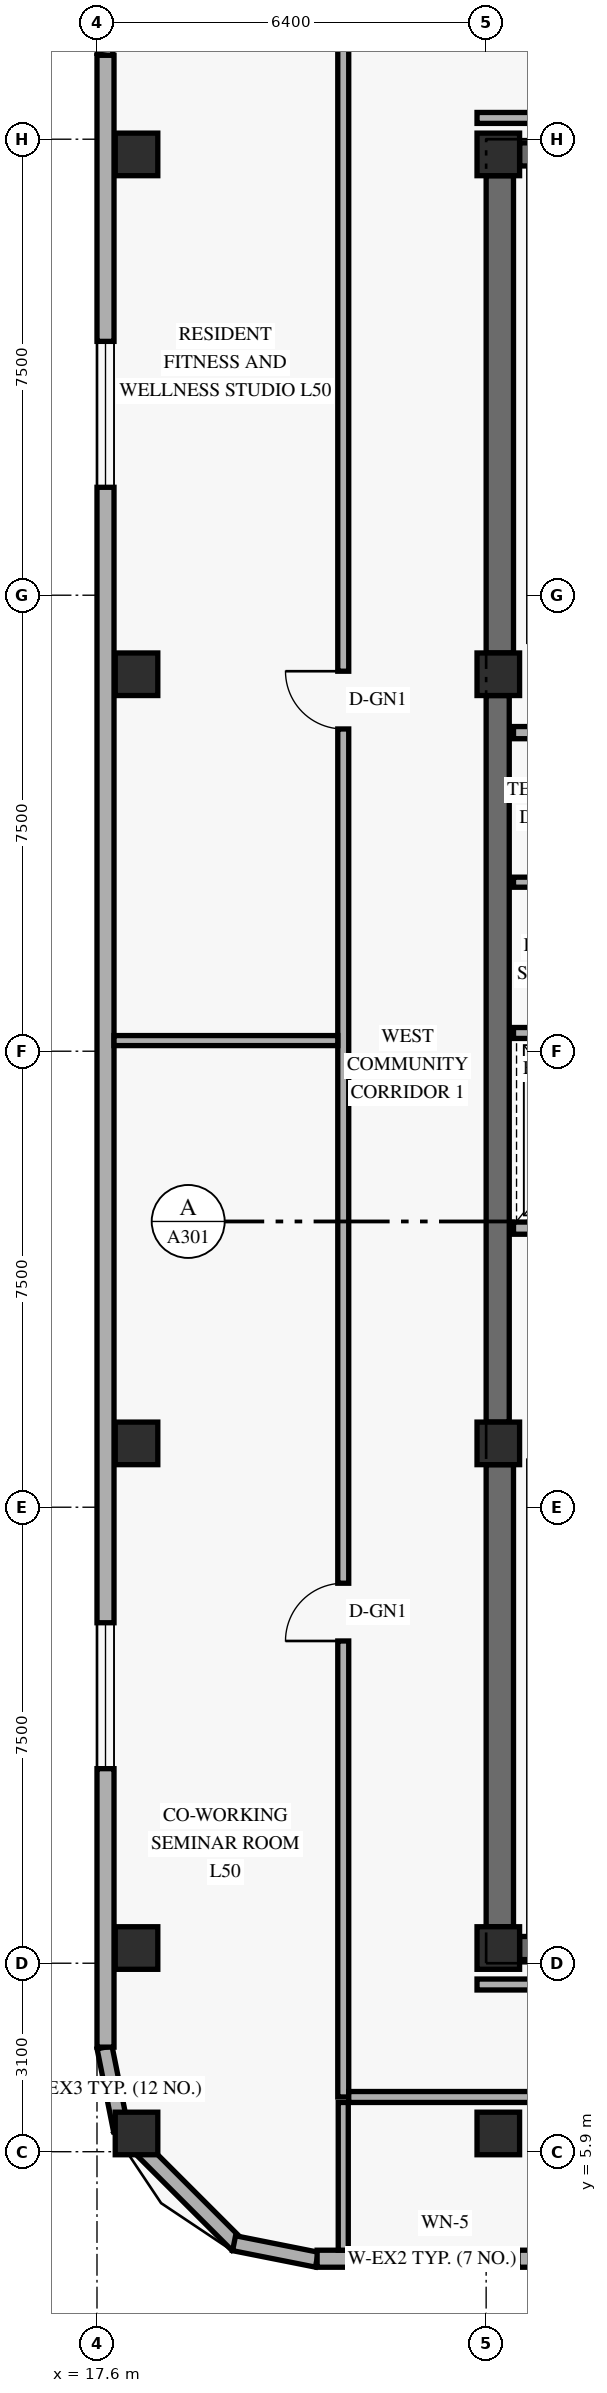
"""IFC4 building model, lengths in metres.
Left out: names, types, materials, properties, quantities, classifications, styles, units other than length and angle.
Written with IfcOpenShell. Run it as: python <this file> out.ifc"""

import sys

from ifc_helpers import new_model, si_unit, direction, frame, frame_2d, origin, origin_2d, place, context, subcontext, project, spatial, rectangle, extrude, element, fill, save


model = new_model("IFC4")
c1 = context("Model", 3, precision=1e-05, world=origin(), true_north=direction((0.0, 1.0)))
c2 = subcontext(c1, "Body", "Model", "MODEL_VIEW")
j1 = project(units=[si_unit("LENGTHUNIT", "METRE"), si_unit("PLANEANGLEUNIT", "RADIAN")], contexts=[c1])
p1 = place(None, origin())
s1 = spatial("IfcSite", under=j1, at=p1, CompositionType="ELEMENT")
p2 = place(p1, origin())
s2 = spatial("IfcBuilding", under=s1, at=p2, CompositionType="ELEMENT")
p3 = place(p2, frame((0.0, 0.0, 192.0)))
s3 = spatial("IfcBuildingStorey", under=s2, at=p3, CompositionType="ELEMENT", Elevation=192.0)
p4 = place(p3, frame((24.225, 9.6, 0.0), z_axis=(0.0, 0.0, 1.0), x_axis=(0.0, 1.0, 0.0)))
e1 = element("IfcWall", 1, at=p4, inside=s3, PredefinedType="SHEAR", context=c2, shape_type="SweptSolid", body=[
    extrude(rectangle(XDim=7.6, YDim=0.45, at=frame_2d((3.8, 0.0))), origin(), (0.0, 0.0, 1.0), 3.348),
])
p5 = place(p3, frame((24.19, 17.9, 0.0), z_axis=(0.0, 0.0, 1.0), x_axis=(0.0, 1.0, 0.0)))
e2 = element("IfcWall", 2, at=p5, inside=s3, PredefinedType="SHEAR", context=c2, shape_type="SweptSolid", body=[
    extrude(rectangle(XDim=11.95, YDim=0.38, at=frame_2d((5.975, 0.0))), origin(), (0.0, 0.0, 1.0), 3.348),
])
p6 = place(p3, frame((24.225, 30.55, 0.0), z_axis=(0.0, 0.0, 1.0), x_axis=(0.0, 1.0, 0.0)))
e3 = element("IfcWall", 3, at=p6, inside=s3, PredefinedType="SHEAR", context=c2, shape_type="SweptSolid", body=[
    extrude(rectangle(XDim=7.85, YDim=0.45, at=frame_2d((3.925, 0.0))), origin(), (0.0, 0.0, 1.0), 3.348),
])
for number, where, z_axis, x_axis in (
    (4, (24.55, 9.25, 0.0), (0.0, 0.0, 1.0), (1.0, 0.0, 0.0)),
    (5, (24.55, 38.75, 0.0), (0.0, 0.0, 1.0), (1.0, 0.0, 0.0)),
):
    element("IfcWall", number, at=place(p3, frame(where, z_axis=z_axis, x_axis=x_axis)), inside=s3, PredefinedType="SHEAR", context=c2, shape_type="SweptSolid", body=[
        extrude(rectangle(XDim=10.3, YDim=0.38, at=frame_2d((5.15, 0.0))), origin(), (0.0, 0.0, 1.0), 3.96),
    ])
for number, where, z_axis, x_axis in (
    (6, (18.25, 6.2, 0.0), (0.0, 0.0, 1.0), (1.0, 0.0, 0.0)),
    (7, (18.25, 9.25, 0.0), (0.0, 0.0, 1.0), (1.0, 0.0, 0.0)),
    (8, (18.25, 17.55, 0.0), (0.0, 0.0, 1.0), (1.0, 0.0, 0.0)),
    (9, (18.25, 30.2, 0.0), (0.0, 0.0, 1.0), (1.0, 0.0, 0.0)),
    (10, (18.25, 38.75, 0.0), (0.0, 0.0, 1.0), (1.0, 0.0, 0.0)),
    (11, (24.2, 6.2, 0.0), (0.0, 0.0, 1.0), (1.0, 0.0, 0.0)),
    (12, (24.2, 9.25, 0.0), (0.0, 0.0, 1.0), (1.0, 0.0, 0.0)),
    (13, (24.2, 17.55, 0.0), (0.0, 0.0, 1.0), (1.0, 0.0, 0.0)),
    (14, (24.2, 30.2, 0.0), (0.0, 0.0, 1.0), (1.0, 0.0, 0.0)),
    (15, (24.2, 38.75, 0.0), (0.0, 0.0, 1.0), (1.0, 0.0, 0.0)),
):
    element("IfcColumn", number, at=place(p3, frame(where, z_axis=z_axis, x_axis=x_axis)), inside=s3, PredefinedType="COLUMN", context=c2, shape_type="SweptSolid", body=[
        extrude(rectangle(XDim=0.7, YDim=0.7, at=origin_2d()), origin(), (0.0, 0.0, 1.0), 4.2),
    ])
p7 = place(p3, frame((17.724, 7.616, 0.0), z_axis=(0.0, 0.0, 1.0), x_axis=(0.195135625965, -0.9807762678, 0.0)))
e16 = element("IfcWall", 16, at=p7, inside=s3, PredefinedType="SOLIDWALL", context=c2, shape_type="SweptSolid", body=[
    extrude(rectangle(XDim=1.389, YDim=0.25, at=frame_2d((0.694, 0.0))), origin(), (0.0, 0.0, 1.0), 3.96),
])
p8 = place(p3, frame((17.968, 6.305, 0.0), z_axis=(0.0, 0.0, 1.0), x_axis=(0.707106781187, -0.707106781187, 0.0)))
e17 = element("IfcWall", 17, at=p8, inside=s3, PredefinedType="SOLIDWALL", context=c2, shape_type="SweptSolid", body=[
    extrude(rectangle(XDim=2.739, YDim=0.25, at=frame_2d((1.37, 0.0))), origin(), (0.0, 0.0, 1.0), 3.96),
])
for number, where, z_axis, x_axis in (
    (18, (19.854, 4.395, 0.0), (0.0, 0.0, 1.0), (0.981, -0.195, 0.0)),
    (19, (17.995, 41.746, 0.0), (0.0, 0.0, 1.0), (-0.195, -0.981, 0.0)),
):
    element("IfcWall", number, at=place(p3, frame(where, z_axis=z_axis, x_axis=x_axis)), inside=s3, PredefinedType="SOLIDWALL", context=c2, shape_type="SweptSolid", body=[
        extrude(rectangle(XDim=1.389, YDim=0.25, at=frame_2d((0.694, 0.0))), origin(), (0.0, 0.0, 1.0), 3.96),
    ])
p9 = place(p3, frame((21.22, 4.14, 0.0), z_axis=(0.0, 0.0, 1.0), x_axis=(1.0, 0.0, 0.0)))
e20 = element("IfcWall", 20, at=p9, inside=s3, PredefinedType="SOLIDWALL", context=c2, shape_type="SweptSolid", body=[
    extrude(rectangle(XDim=3.78, YDim=0.28, at=frame_2d((1.89, 0.0))), origin(), (0.0, 0.0, 1.0), 3.96),
])
p10 = place(p9, frame((0.905, 0.0, 0.85)))
e21 = element("IfcOpeningElement", 21, at=p10, cuts=e20, PredefinedType="OPENING", context=c2, shape_type="SweptSolid", body=[
    extrude(rectangle(XDim=2.4, YDim=1.9, at=frame_2d((1.2, 0.95))), frame((0.0, 0.15, 0.0), z_axis=(0.0, -1.0, 0.0), x_axis=(1.0, 0.0, 0.0)), (0.0, 0.0, 1.0), 0.3),
])
p11 = place(p3, frame((17.74, 40.38, 0.0), z_axis=(0.0, 0.0, 1.0), x_axis=(0.0, -1.0, 0.0)))
e22 = element("IfcWall", 22, at=p11, inside=s3, PredefinedType="SOLIDWALL", context=c2, shape_type="SweptSolid", body=[
    extrude(rectangle(XDim=32.76, YDim=0.28, at=frame_2d((16.38, 0.0))), origin(), (0.0, 0.0, 1.0), 3.96),
])
p12 = place(p11, frame((25.78, 0.0, 0.85)))
e23 = element("IfcOpeningElement", 23, at=p12, cuts=e22, PredefinedType="OPENING", context=c2, shape_type="SweptSolid", body=[
    extrude(rectangle(XDim=2.4, YDim=1.9, at=frame_2d((1.2, 0.95))), frame((0.0, 0.15, 0.0), z_axis=(0.0, -1.0, 0.0), x_axis=(1.0, 0.0, 0.0)), (0.0, 0.0, 1.0), 0.3),
])
p13 = place(p11, frame((4.705, 0.0, 0.85)))
e24 = element("IfcOpeningElement", 24, at=p13, cuts=e22, PredefinedType="OPENING", context=c2, shape_type="SweptSolid", body=[
    extrude(rectangle(XDim=2.4, YDim=1.9, at=frame_2d((1.2, 0.95))), frame((0.0, 0.15, 0.0), z_axis=(0.0, -1.0, 0.0), x_axis=(1.0, 0.0, 0.0)), (0.0, 0.0, 1.0), 0.3),
])
p14 = place(p3, frame((24.45, 21.09, 0.0), z_axis=(0.0, 0.0, 1.0), x_axis=(1.0, 0.0, 0.0)))
e25 = element("IfcWall", 25, at=p14, inside=s3, PredefinedType="STANDARD", context=c2, shape_type="SweptSolid", body=[
    extrude(rectangle(XDim=6.83, YDim=0.2, at=frame_2d((3.415, 0.0))), origin(), (0.0, 0.0, 1.0), 3.96),
])
p15 = place(p14, frame((0.72, 0.0, 0.0)))
e26 = element("IfcOpeningElement", 26, at=p15, cuts=e25, PredefinedType="OPENING", context=c2, shape_type="SweptSolid", body=[
    extrude(rectangle(XDim=1.1, YDim=2.2, at=frame_2d((0.55, 1.1))), frame((0.0, 0.11, 0.0), z_axis=(0.0, -1.0, 0.0), x_axis=(1.0, 0.0, 0.0)), (0.0, 0.0, 1.0), 0.22),
])
p16 = place(p14, frame((3.32, 0.0, 0.0)))
e27 = element("IfcOpeningElement", 27, at=p16, cuts=e25, PredefinedType="OPENING", context=c2, shape_type="SweptSolid", body=[
    extrude(rectangle(XDim=1.1, YDim=2.2, at=frame_2d((0.55, 1.1))), frame((0.0, 0.11, 0.0), z_axis=(0.0, -1.0, 0.0), x_axis=(1.0, 0.0, 0.0)), (0.0, 0.0, 1.0), 0.22),
])
p17 = place(p3, frame((24.45, 24.3, 0.0), z_axis=(0.0, 0.0, 1.0), x_axis=(1.0, 0.0, 0.0)))
e28 = element("IfcWall", 28, at=p17, inside=s3, PredefinedType="STANDARD", context=c2, shape_type="SweptSolid", body=[
    extrude(rectangle(XDim=6.83, YDim=0.18, at=frame_2d((3.415, 0.0))), origin(), (0.0, 0.0, 1.0), 3.96),
])
p18 = place(p3, frame((24.45, 29.24, 0.0), z_axis=(0.0, 0.0, 1.0), x_axis=(1.0, 0.0, 0.0)))
e29 = element("IfcWall", 29, at=p18, inside=s3, PredefinedType="STANDARD", context=c2, shape_type="SweptSolid", body=[
    extrude(rectangle(XDim=3.65, YDim=0.2, at=frame_2d((1.825, 0.0))), origin(), (0.0, 0.0, 1.0), 3.96),
])
p19 = place(p3, frame((24.45, 26.78, 0.0), z_axis=(0.0, 0.0, 1.0), x_axis=(1.0, 0.0, 0.0)))
e30 = element("IfcWall", 30, at=p19, inside=s3, PredefinedType="PARTITIONING", context=c2, shape_type="SweptSolid", body=[
    extrude(rectangle(XDim=3.55, YDim=0.165, at=frame_2d((1.775, 0.0))), origin(), (0.0, 0.0, 1.0), 3.96),
])
p20 = place(p3, frame((21.65, 6.8, 0.0), z_axis=(0.0, 0.0, 1.0), x_axis=(0.0, 1.0, 0.0)))
e31 = element("IfcWall", 31, at=p20, inside=s3, PredefinedType="STANDARD", context=c2, shape_type="SweptSolid", body=[
    extrude(rectangle(XDim=34.4, YDim=0.18, at=frame_2d((17.2, 0.0))), origin(), (0.0, 0.0, 1.0), 3.33),
])
p21 = place(p20, frame((7.5, 0.0, 0.0)))
e32 = element("IfcOpeningElement", 32, at=p21, cuts=e31, PredefinedType="OPENING", context=c2, shape_type="SweptSolid", body=[
    extrude(rectangle(XDim=0.95, YDim=2.15, at=frame_2d((0.475, 1.075))), frame((0.0, 0.1, 0.0), z_axis=(0.0, -1.0, 0.0), x_axis=(1.0, 0.0, 0.0)), (0.0, 0.0, 1.0), 0.2),
])
p22 = place(p20, frame((22.5, 0.0, 0.0)))
e33 = element("IfcOpeningElement", 33, at=p22, cuts=e31, PredefinedType="OPENING", context=c2, shape_type="SweptSolid", body=[
    extrude(rectangle(XDim=0.95, YDim=2.15, at=frame_2d((0.475, 1.075))), frame((0.0, 0.1, 0.0), z_axis=(0.0, -1.0, 0.0), x_axis=(1.0, 0.0, 0.0)), (0.0, 0.0, 1.0), 0.2),
])
p23 = place(p3, frame((21.74, 6.8, 0.0), z_axis=(0.0, 0.0, 1.0), x_axis=(1.0, 0.0, 0.0)))
e34 = element("IfcWall", 34, at=p23, inside=s3, PredefinedType="STANDARD", context=c2, shape_type="SweptSolid", body=[
    extrude(rectangle(XDim=15.57, YDim=0.18, at=frame_2d((7.785, 0.0))), origin(), (0.0, 0.0, 1.0), 3.33),
])
p24 = place(p23, frame((5.41, 0.0, 0.0)))
e35 = element("IfcOpeningElement", 35, at=p24, cuts=e34, PredefinedType="OPENING", context=c2, shape_type="SweptSolid", body=[
    extrude(rectangle(XDim=0.95, YDim=2.15, at=frame_2d((0.475, 1.075))), frame((0.0, 0.1, 0.0), z_axis=(0.0, -1.0, 0.0), x_axis=(1.0, 0.0, 0.0)), (0.0, 0.0, 1.0), 0.2),
])
for number, where, z_axis, x_axis in (
    (36, (23.85, 8.65, 0.0), (0.0, 0.0, 1.0), (1.0, 0.0, 0.0)),
    (37, (23.85, 39.35, 0.0), (0.0, 0.0, 1.0), (1.0, 0.0, 0.0)),
):
    element("IfcWall", number, at=place(p3, frame(where, z_axis=z_axis, x_axis=x_axis)), inside=s3, PredefinedType="STANDARD", context=c2, shape_type="SweptSolid", body=[
        extrude(rectangle(XDim=11.48, YDim=0.18, at=frame_2d((5.74, 0.0))), origin(), (0.0, 0.0, 1.0), 3.33),
    ])
p25 = place(p3, frame((21.65, 4.28, 0.0), z_axis=(0.0, 0.0, 1.0), x_axis=(0.0, 1.0, 0.0)))
e38 = element("IfcWall", 38, at=p25, inside=s3, PredefinedType="PARTITIONING", context=c2, shape_type="SweptSolid", body=[
    extrude(rectangle(XDim=2.43, YDim=0.165, at=frame_2d((1.215, 0.0))), origin(), (0.0, 0.0, 1.0), 3.479),
])
p26 = place(p3, frame((17.88, 24.175, 0.0), z_axis=(0.0, 0.0, 1.0), x_axis=(1.0, 0.0, 0.0)))
e39 = element("IfcWall", 39, at=p26, inside=s3, PredefinedType="PARTITIONING", context=c2, shape_type="SweptSolid", body=[
    extrude(rectangle(XDim=3.68, YDim=0.165, at=frame_2d((1.84, 0.0))), origin(), (0.0, 0.0, 1.0), 3.479),
])
p27 = place(p10, origin())
e40 = element("IfcWindow", 40, at=p27, inside=s3, PartitioningType="SINGLE_PANEL", PredefinedType="WINDOW", context=c2, shape_type="SweptSolid", body=[
    extrude(rectangle(XDim=2.4, YDim=1.9, at=frame_2d((1.2, 0.95))), frame((0.0, 0.03, 0.0), z_axis=(0.0, -1.0, 0.0), x_axis=(1.0, 0.0, 0.0)), (0.0, 0.0, 1.0), 0.06),
])
fill(e21, e40)
p28 = place(p12, origin())
e41 = element("IfcWindow", 41, at=p28, inside=s3, PartitioningType="SINGLE_PANEL", PredefinedType="WINDOW", context=c2, shape_type="SweptSolid", body=[
    extrude(rectangle(XDim=2.4, YDim=1.9, at=frame_2d((1.2, 0.95))), frame((0.0, 0.03, 0.0), z_axis=(0.0, -1.0, 0.0), x_axis=(1.0, 0.0, 0.0)), (0.0, 0.0, 1.0), 0.06),
])
fill(e23, e41)
p29 = place(p13, origin())
e42 = element("IfcWindow", 42, at=p29, inside=s3, PartitioningType="SINGLE_PANEL", PredefinedType="WINDOW", context=c2, shape_type="SweptSolid", body=[
    extrude(rectangle(XDim=2.4, YDim=1.9, at=frame_2d((1.2, 0.95))), frame((0.0, 0.03, 0.0), z_axis=(0.0, -1.0, 0.0), x_axis=(1.0, 0.0, 0.0)), (0.0, 0.0, 1.0), 0.06),
])
fill(e24, e42)
p30 = place(p21, origin())
e43 = element("IfcDoor", 43, at=p30, inside=s3, OperationType="SINGLE_SWING_LEFT", PredefinedType="DOOR", context=c2, shape_type="SweptSolid", body=[
    extrude(rectangle(XDim=0.95, YDim=2.15, at=frame_2d((0.475, 1.075))), frame((0.0, 0.025, 0.0), z_axis=(0.0, -1.0, 0.0), x_axis=(1.0, 0.0, 0.0)), (0.0, 0.0, 1.0), 0.05),
])
fill(e32, e43)
p31 = place(p22, origin())
e44 = element("IfcDoor", 44, at=p31, inside=s3, OperationType="SINGLE_SWING_RIGHT", PredefinedType="DOOR", context=c2, shape_type="SweptSolid", body=[
    extrude(rectangle(XDim=0.95, YDim=2.15, at=frame_2d((0.475, 1.075))), frame((0.0, 0.025, 0.0), z_axis=(0.0, -1.0, 0.0), x_axis=(1.0, 0.0, 0.0)), (0.0, 0.0, 1.0), 0.05),
])
fill(e33, e44)
save(model, sys.argv[1])
